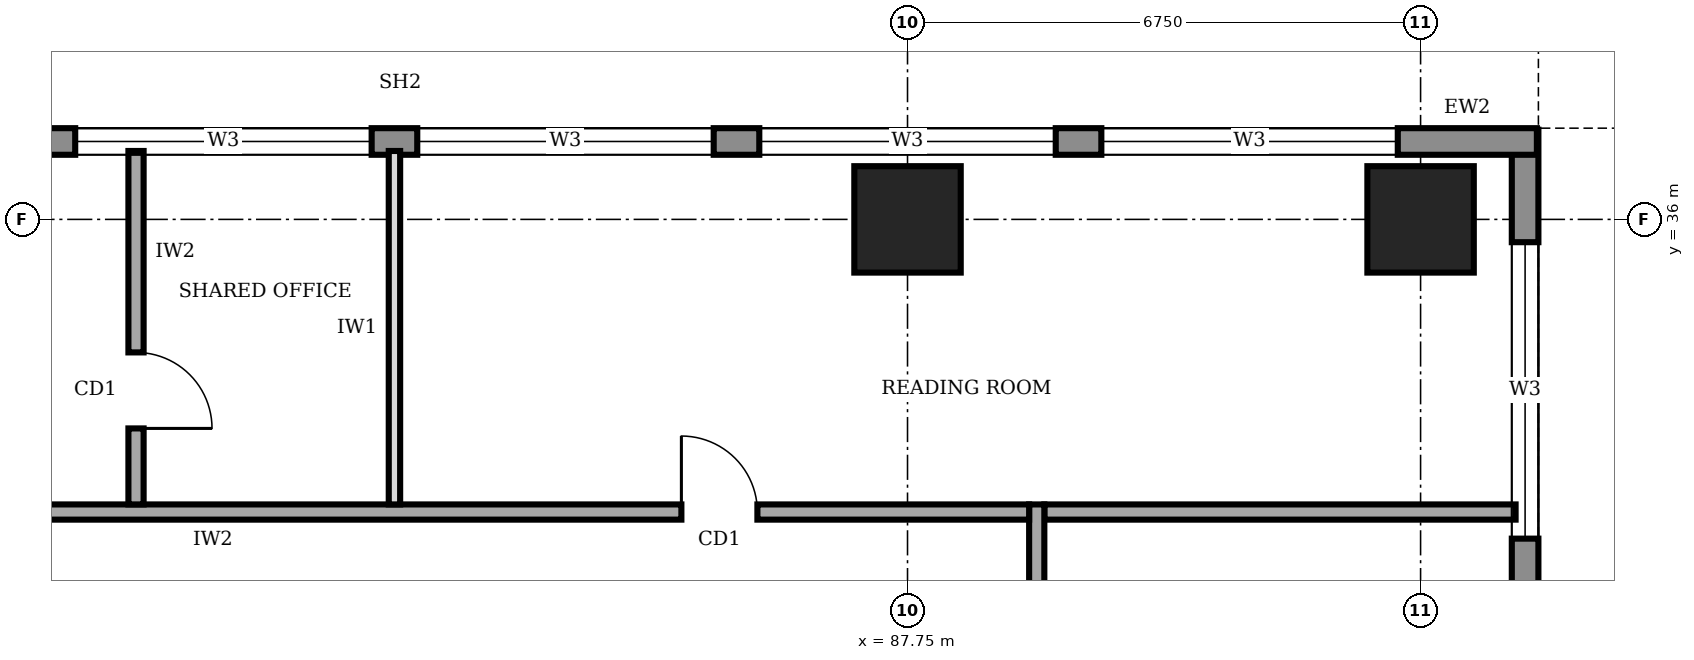
"""IFC4 building model, lengths in metres.
Left out: names, types, materials, properties, quantities, classifications, styles, units other than length and angle.
Written with IfcOpenShell. Run it as: python <this file> out.ifc"""

import sys

from ifc_helpers import new_model, si_unit, direction, frame, frame_2d, origin, origin_2d, place, context, subcontext, project, spatial, rectangle, extrude, element, fill, save


model = new_model("IFC4")
c1 = context("Model", 3, precision=1e-05, world=origin(), true_north=direction((0.0, 1.0)))
c2 = subcontext(c1, "Body", "Model", "MODEL_VIEW")
j1 = project(units=[si_unit("LENGTHUNIT", "METRE"), si_unit("PLANEANGLEUNIT", "RADIAN")], contexts=[c1])
p1 = place(None, origin())
s1 = spatial("IfcSite", under=j1, at=p1, CompositionType="ELEMENT")
p2 = place(p1, origin())
s2 = spatial("IfcBuilding", under=s1, at=p2, CompositionType="ELEMENT")
p3 = place(p2, frame((0.0, 0.0, 181.0)))
s3 = spatial("IfcBuildingStorey", under=s2, at=p3, CompositionType="ELEMENT", Elevation=181.0)
for number, where, z_axis, x_axis in (
    (1, (87.75, 36.0, 0.0), (0.0, 0.0, 1.0), (1.0, 0.0, 0.0)),
    (2, (94.5, 36.0, 0.0), (0.0, 0.0, 1.0), (1.0, 0.0, 0.0)),
):
    element("IfcColumn", number, at=place(p3, frame(where, z_axis=z_axis, x_axis=x_axis)), inside=s3, PredefinedType="COLUMN", context=c2, shape_type="SweptSolid", body=[
        extrude(rectangle(XDim=1.4, YDim=1.4, at=origin_2d()), origin(), (0.0, 0.0, 1.0), 4.0),
    ])
p4 = place(p3, frame((95.875, 3.32, 0.0), z_axis=(0.0, 0.0, 1.0), x_axis=(0.0, 1.0, 0.0)))
e3 = element("IfcWall", 3, at=p4, inside=s3, PredefinedType="STANDARD", context=c2, shape_type="SweptSolid", body=[
    extrude(rectangle(XDim=33.86, YDim=0.35, at=frame_2d((16.93, 0.0))), origin(), (0.0, 0.0, 1.0), 3.75),
])
p5 = place(p4, frame((1.48, 0.0, 0.95)))
e4 = element("IfcOpeningElement", 4, at=p5, cuts=e3, PredefinedType="OPENING", context=c2, shape_type="SweptSolid", body=[
    extrude(rectangle(XDim=3.9, YDim=1.8, at=frame_2d((1.95, 0.9))), frame((0.0, 0.185, 0.0), z_axis=(0.0, -1.0, 0.0), x_axis=(1.0, 0.0, 0.0)), (0.0, 0.0, 1.0), 0.37),
])
p6 = place(p4, frame((5.98, 0.0, 0.95)))
e5 = element("IfcOpeningElement", 5, at=p6, cuts=e3, PredefinedType="OPENING", context=c2, shape_type="SweptSolid", body=[
    extrude(rectangle(XDim=3.9, YDim=1.8, at=frame_2d((1.95, 0.9))), frame((0.0, 0.185, 0.0), z_axis=(0.0, -1.0, 0.0), x_axis=(1.0, 0.0, 0.0)), (0.0, 0.0, 1.0), 0.37),
])
p7 = place(p4, frame((10.48, 0.0, 0.95)))
e6 = element("IfcOpeningElement", 6, at=p7, cuts=e3, PredefinedType="OPENING", context=c2, shape_type="SweptSolid", body=[
    extrude(rectangle(XDim=3.9, YDim=1.8, at=frame_2d((1.95, 0.9))), frame((0.0, 0.185, 0.0), z_axis=(0.0, -1.0, 0.0), x_axis=(1.0, 0.0, 0.0)), (0.0, 0.0, 1.0), 0.37),
])
p8 = place(p4, frame((14.98, 0.0, 0.95)))
e7 = element("IfcOpeningElement", 7, at=p8, cuts=e3, PredefinedType="OPENING", context=c2, shape_type="SweptSolid", body=[
    extrude(rectangle(XDim=3.9, YDim=1.8, at=frame_2d((1.95, 0.9))), frame((0.0, 0.185, 0.0), z_axis=(0.0, -1.0, 0.0), x_axis=(1.0, 0.0, 0.0)), (0.0, 0.0, 1.0), 0.37),
])
p9 = place(p4, frame((19.48, 0.0, 0.95)))
e8 = element("IfcOpeningElement", 8, at=p9, cuts=e3, PredefinedType="OPENING", context=c2, shape_type="SweptSolid", body=[
    extrude(rectangle(XDim=3.9, YDim=1.8, at=frame_2d((1.95, 0.9))), frame((0.0, 0.185, 0.0), z_axis=(0.0, -1.0, 0.0), x_axis=(1.0, 0.0, 0.0)), (0.0, 0.0, 1.0), 0.37),
])
p10 = place(p4, frame((23.98, 0.0, 0.95)))
e9 = element("IfcOpeningElement", 9, at=p10, cuts=e3, PredefinedType="OPENING", context=c2, shape_type="SweptSolid", body=[
    extrude(rectangle(XDim=3.9, YDim=1.8, at=frame_2d((1.95, 0.9))), frame((0.0, 0.185, 0.0), z_axis=(0.0, -1.0, 0.0), x_axis=(1.0, 0.0, 0.0)), (0.0, 0.0, 1.0), 0.37),
])
p11 = place(p4, frame((28.48, 0.0, 0.95)))
e10 = element("IfcOpeningElement", 10, at=p11, cuts=e3, PredefinedType="OPENING", context=c2, shape_type="SweptSolid", body=[
    extrude(rectangle(XDim=3.9, YDim=1.8, at=frame_2d((1.95, 0.9))), frame((0.0, 0.185, 0.0), z_axis=(0.0, -1.0, 0.0), x_axis=(1.0, 0.0, 0.0)), (0.0, 0.0, 1.0), 0.37),
])
p12 = place(p3, frame((96.03, 37.025, 0.0), z_axis=(0.0, 0.0, 1.0), x_axis=(-1.0, 0.0, 0.0)))
e11 = element("IfcWall", 11, at=p12, inside=s3, PredefinedType="STANDARD", context=c2, shape_type="SweptSolid", body=[
    extrude(rectangle(XDim=29.91, YDim=0.35, at=frame_2d((14.955, 0.0))), origin(), (0.0, 0.0, 1.0), 3.75),
])
p13 = place(p12, frame((24.33, 0.0, 0.95)))
e12 = element("IfcOpeningElement", 12, at=p13, cuts=e11, PredefinedType="OPENING", context=c2, shape_type="SweptSolid", body=[
    extrude(rectangle(XDim=3.9, YDim=1.8, at=frame_2d((1.95, 0.9))), frame((0.0, 0.185, 0.0), z_axis=(0.0, -1.0, 0.0), x_axis=(1.0, 0.0, 0.0)), (0.0, 0.0, 1.0), 0.37),
])
p14 = place(p12, frame((19.83, 0.0, 0.95)))
e13 = element("IfcOpeningElement", 13, at=p14, cuts=e11, PredefinedType="OPENING", context=c2, shape_type="SweptSolid", body=[
    extrude(rectangle(XDim=3.9, YDim=1.8, at=frame_2d((1.95, 0.9))), frame((0.0, 0.185, 0.0), z_axis=(0.0, -1.0, 0.0), x_axis=(1.0, 0.0, 0.0)), (0.0, 0.0, 1.0), 0.37),
])
p15 = place(p12, frame((15.33, 0.0, 0.95)))
e14 = element("IfcOpeningElement", 14, at=p15, cuts=e11, PredefinedType="OPENING", context=c2, shape_type="SweptSolid", body=[
    extrude(rectangle(XDim=3.9, YDim=1.8, at=frame_2d((1.95, 0.9))), frame((0.0, 0.185, 0.0), z_axis=(0.0, -1.0, 0.0), x_axis=(1.0, 0.0, 0.0)), (0.0, 0.0, 1.0), 0.37),
])
p16 = place(p12, frame((10.83, 0.0, 0.95)))
e15 = element("IfcOpeningElement", 15, at=p16, cuts=e11, PredefinedType="OPENING", context=c2, shape_type="SweptSolid", body=[
    extrude(rectangle(XDim=3.9, YDim=1.8, at=frame_2d((1.95, 0.9))), frame((0.0, 0.185, 0.0), z_axis=(0.0, -1.0, 0.0), x_axis=(1.0, 0.0, 0.0)), (0.0, 0.0, 1.0), 0.37),
])
p17 = place(p12, frame((6.33, 0.0, 0.95)))
e16 = element("IfcOpeningElement", 16, at=p17, cuts=e11, PredefinedType="OPENING", context=c2, shape_type="SweptSolid", body=[
    extrude(rectangle(XDim=3.9, YDim=1.8, at=frame_2d((1.95, 0.9))), frame((0.0, 0.185, 0.0), z_axis=(0.0, -1.0, 0.0), x_axis=(1.0, 0.0, 0.0)), (0.0, 0.0, 1.0), 0.37),
])
p18 = place(p12, frame((1.83, 0.0, 0.95)))
e17 = element("IfcOpeningElement", 17, at=p18, cuts=e11, PredefinedType="OPENING", context=c2, shape_type="SweptSolid", body=[
    extrude(rectangle(XDim=3.9, YDim=1.8, at=frame_2d((1.95, 0.9))), frame((0.0, 0.185, 0.0), z_axis=(0.0, -1.0, 0.0), x_axis=(1.0, 0.0, 0.0)), (0.0, 0.0, 1.0), 0.37),
])
p19 = place(p3, frame((89.45, 9.2, 0.0), z_axis=(0.0, 0.0, 1.0), x_axis=(0.0, 1.0, 0.0)))
e18 = element("IfcWall", 18, at=p19, inside=s3, PredefinedType="SOLIDWALL", context=c2, shape_type="SweptSolid", body=[
    extrude(rectangle(XDim=23.05, YDim=0.2, at=frame_2d((11.525, 0.0))), origin(), (0.0, 0.0, 1.0), 3.75),
])
p20 = place(p19, frame((1.55, 0.0, 0.0)))
e19 = element("IfcOpeningElement", 19, at=p20, cuts=e18, PredefinedType="OPENING", context=c2, shape_type="SweptSolid", body=[
    extrude(rectangle(XDim=1.0, YDim=2.1, at=frame_2d((0.5, 1.05))), frame((0.0, 0.11, 0.0), z_axis=(0.0, -1.0, 0.0), x_axis=(1.0, 0.0, 0.0)), (0.0, 0.0, 1.0), 0.22),
])
p21 = place(p19, frame((5.55, 0.0, 0.0)))
e20 = element("IfcOpeningElement", 20, at=p21, cuts=e18, PredefinedType="OPENING", context=c2, shape_type="SweptSolid", body=[
    extrude(rectangle(XDim=0.9, YDim=2.1, at=frame_2d((0.45, 1.05))), frame((0.0, 0.11, 0.0), z_axis=(0.0, -1.0, 0.0), x_axis=(1.0, 0.0, 0.0)), (0.0, 0.0, 1.0), 0.22),
])
p22 = place(p19, frame((10.35, 0.0, 0.0)))
e21 = element("IfcOpeningElement", 21, at=p22, cuts=e18, PredefinedType="OPENING", context=c2, shape_type="SweptSolid", body=[
    extrude(rectangle(XDim=0.9, YDim=2.1, at=frame_2d((0.45, 1.05))), frame((0.0, 0.11, 0.0), z_axis=(0.0, -1.0, 0.0), x_axis=(1.0, 0.0, 0.0)), (0.0, 0.0, 1.0), 0.22),
])
p23 = place(p19, frame((13.4, 0.0, 0.0)))
e22 = element("IfcOpeningElement", 22, at=p23, cuts=e18, PredefinedType="OPENING", context=c2, shape_type="SweptSolid", body=[
    extrude(rectangle(XDim=0.9, YDim=2.1, at=frame_2d((0.45, 1.05))), frame((0.0, 0.11, 0.0), z_axis=(0.0, -1.0, 0.0), x_axis=(1.0, 0.0, 0.0)), (0.0, 0.0, 1.0), 0.22),
])
p24 = place(p19, frame((16.3, 0.0, 0.0)))
e23 = element("IfcOpeningElement", 23, at=p24, cuts=e18, PredefinedType="OPENING", context=c2, shape_type="SweptSolid", body=[
    extrude(rectangle(XDim=1.0, YDim=2.1, at=frame_2d((0.5, 1.05))), frame((0.0, 0.11, 0.0), z_axis=(0.0, -1.0, 0.0), x_axis=(1.0, 0.0, 0.0)), (0.0, 0.0, 1.0), 0.22),
])
p25 = place(p19, frame((8.2, 0.0, 0.0)))
e24 = element("IfcOpeningElement", 24, at=p25, cuts=e18, PredefinedType="OPENING", context=c2, shape_type="SweptSolid", body=[
    extrude(rectangle(XDim=1.0, YDim=2.1, at=frame_2d((0.5, 1.05))), frame((0.0, 0.11, 0.0), z_axis=(0.0, -1.0, 0.0), x_axis=(1.0, 0.0, 0.0)), (0.0, 0.0, 1.0), 0.22),
])
p26 = place(p19, frame((19.925, 0.0, 0.0)))
e25 = element("IfcOpeningElement", 25, at=p26, cuts=e18, PredefinedType="OPENING", context=c2, shape_type="SweptSolid", body=[
    extrude(rectangle(XDim=1.0, YDim=2.1, at=frame_2d((0.5, 1.05))), frame((0.0, 0.11, 0.0), z_axis=(0.0, -1.0, 0.0), x_axis=(1.0, 0.0, 0.0)), (0.0, 0.0, 1.0), 0.22),
])
p27 = place(p3, frame((89.35, 32.15, 0.0), z_axis=(0.0, 0.0, 1.0), x_axis=(-1.0, 0.0, 0.0)))
e26 = element("IfcWall", 26, at=p27, inside=s3, PredefinedType="SOLIDWALL", context=c2, shape_type="SweptSolid", body=[
    extrude(rectangle(XDim=16.9, YDim=0.2, at=frame_2d((8.45, 0.0))), origin(), (0.0, 0.0, 1.0), 3.75),
])
p28 = place(p27, frame((3.575, 0.0, 0.0)))
e27 = element("IfcOpeningElement", 27, at=p28, cuts=e26, PredefinedType="OPENING", context=c2, shape_type="SweptSolid", body=[
    extrude(rectangle(XDim=1.0, YDim=2.1, at=frame_2d((0.5, 1.05))), frame((0.0, 0.11, 0.0), z_axis=(0.0, -1.0, 0.0), x_axis=(1.0, 0.0, 0.0)), (0.0, 0.0, 1.0), 0.22),
])
p29 = place(p3, frame((77.6, 36.9, 0.0), z_axis=(0.0, 0.0, 1.0), x_axis=(0.0, -1.0, 0.0)))
e28 = element("IfcWall", 28, at=p29, inside=s3, PredefinedType="SOLIDWALL", context=c2, shape_type="SweptSolid", body=[
    extrude(rectangle(XDim=4.65, YDim=0.2, at=frame_2d((2.325, 0.0))), origin(), (0.0, 0.0, 1.0), 3.75),
])
p30 = place(p29, frame((2.65, 0.0, 0.0)))
e29 = element("IfcOpeningElement", 29, at=p30, cuts=e28, PredefinedType="OPENING", context=c2, shape_type="SweptSolid", body=[
    extrude(rectangle(XDim=1.0, YDim=2.1, at=frame_2d((0.5, 1.05))), frame((0.0, 0.11, 0.0), z_axis=(0.0, -1.0, 0.0), x_axis=(1.0, 0.0, 0.0)), (0.0, 0.0, 1.0), 0.22),
])
p31 = place(p3, frame((89.55, 32.15, 0.0), z_axis=(0.0, 0.0, 1.0), x_axis=(1.0, 0.0, 0.0)))
e30 = element("IfcWall", 30, at=p31, inside=s3, PredefinedType="SOLIDWALL", context=c2, shape_type="SweptSolid", body=[
    extrude(rectangle(XDim=6.2, YDim=0.2, at=frame_2d((3.1, 0.0))), origin(), (0.0, 0.0, 1.0), 3.75),
])
p32 = place(p3, frame((81.0, 32.25, 0.0), z_axis=(0.0, 0.0, 1.0), x_axis=(0.0, 1.0, 0.0)))
e31 = element("IfcWall", 31, at=p32, inside=s3, PredefinedType="PARTITIONING", context=c2, shape_type="SweptSolid", body=[
    extrude(rectangle(XDim=4.65, YDim=0.15, at=frame_2d((2.325, 0.0))), origin(), (0.0, 0.0, 1.0), 3.75),
])
p33 = place(p11, origin())
e32 = element("IfcWindow", 32, at=p33, inside=s3, PartitioningType="SINGLE_PANEL", PredefinedType="WINDOW", context=c2, shape_type="SweptSolid", body=[
    extrude(rectangle(XDim=3.9, YDim=1.8, at=frame_2d((1.95, 0.9))), frame((0.0, 0.03, 0.0), z_axis=(0.0, -1.0, 0.0), x_axis=(1.0, 0.0, 0.0)), (0.0, 0.0, 1.0), 0.06),
])
fill(e10, e32)
p34 = place(p15, origin())
e33 = element("IfcWindow", 33, at=p34, inside=s3, PartitioningType="SINGLE_PANEL", PredefinedType="WINDOW", context=c2, shape_type="SweptSolid", body=[
    extrude(rectangle(XDim=3.9, YDim=1.8, at=frame_2d((1.95, 0.9))), frame((0.0, 0.03, 0.0), z_axis=(0.0, -1.0, 0.0), x_axis=(1.0, 0.0, 0.0)), (0.0, 0.0, 1.0), 0.06),
])
fill(e14, e33)
p35 = place(p16, origin())
e34 = element("IfcWindow", 34, at=p35, inside=s3, PartitioningType="SINGLE_PANEL", PredefinedType="WINDOW", context=c2, shape_type="SweptSolid", body=[
    extrude(rectangle(XDim=3.9, YDim=1.8, at=frame_2d((1.95, 0.9))), frame((0.0, 0.03, 0.0), z_axis=(0.0, -1.0, 0.0), x_axis=(1.0, 0.0, 0.0)), (0.0, 0.0, 1.0), 0.06),
])
fill(e15, e34)
p36 = place(p17, origin())
e35 = element("IfcWindow", 35, at=p36, inside=s3, PartitioningType="SINGLE_PANEL", PredefinedType="WINDOW", context=c2, shape_type="SweptSolid", body=[
    extrude(rectangle(XDim=3.9, YDim=1.8, at=frame_2d((1.95, 0.9))), frame((0.0, 0.03, 0.0), z_axis=(0.0, -1.0, 0.0), x_axis=(1.0, 0.0, 0.0)), (0.0, 0.0, 1.0), 0.06),
])
fill(e16, e35)
p37 = place(p18, origin())
e36 = element("IfcWindow", 36, at=p37, inside=s3, PartitioningType="SINGLE_PANEL", PredefinedType="WINDOW", context=c2, shape_type="SweptSolid", body=[
    extrude(rectangle(XDim=3.9, YDim=1.8, at=frame_2d((1.95, 0.9))), frame((0.0, 0.03, 0.0), z_axis=(0.0, -1.0, 0.0), x_axis=(1.0, 0.0, 0.0)), (0.0, 0.0, 1.0), 0.06),
])
fill(e17, e36)
p38 = place(p28, frame((1.0, 0.0, 0.0), z_axis=(0.0, 0.0, 1.0), x_axis=(-1.0, 0.0, 0.0)))
e37 = element("IfcDoor", 37, at=p38, inside=s3, OperationType="SINGLE_SWING_LEFT", PredefinedType="DOOR", context=c2, shape_type="SweptSolid", body=[
    extrude(rectangle(XDim=1.0, YDim=2.1, at=frame_2d((0.5, 1.05))), frame((0.0, 0.025, 0.0), z_axis=(0.0, -1.0, 0.0), x_axis=(1.0, 0.0, 0.0)), (0.0, 0.0, 1.0), 0.05),
])
fill(e27, e37)
p39 = place(p30, origin())
e38 = element("IfcDoor", 38, at=p39, inside=s3, OperationType="SINGLE_SWING_RIGHT", PredefinedType="DOOR", context=c2, shape_type="SweptSolid", body=[
    extrude(rectangle(XDim=1.0, YDim=2.1, at=frame_2d((0.5, 1.05))), frame((0.0, 0.025, 0.0), z_axis=(0.0, -1.0, 0.0), x_axis=(1.0, 0.0, 0.0)), (0.0, 0.0, 1.0), 0.05),
])
fill(e29, e38)
save(model, sys.argv[1])
